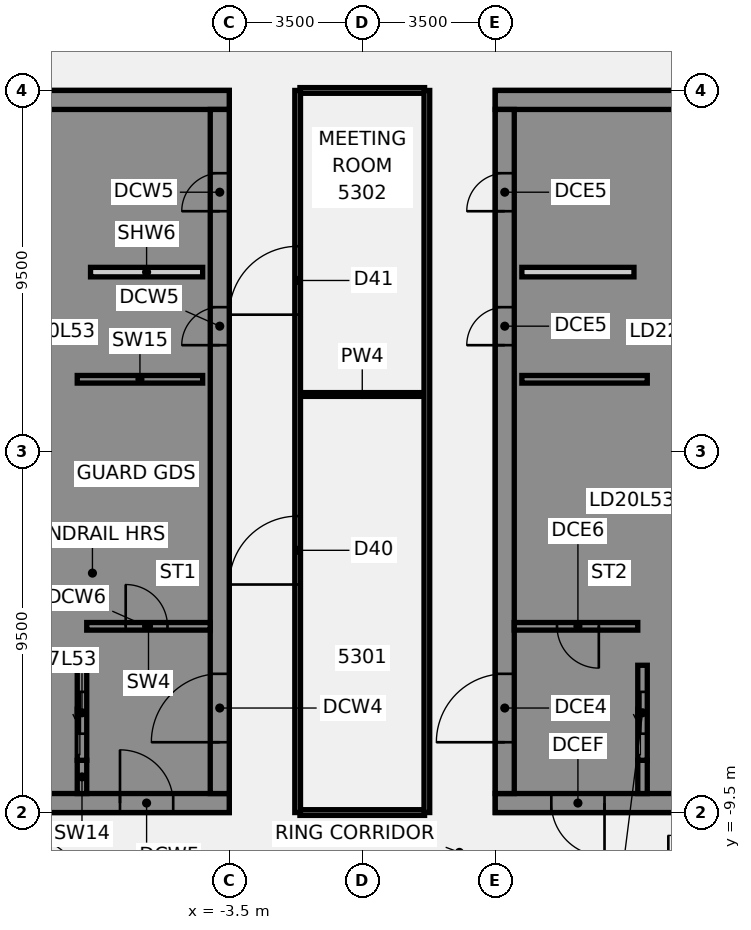
"""IFC4 building model, lengths in metres.
Left out: names, types, materials, properties, quantities, classifications, styles, units other than length and angle.
Written with IfcOpenShell. Run it as: python <this file> out.ifc"""

import sys

from ifc_helpers import new_model, si_unit, direction, frame, frame_2d, origin, place, context, subcontext, project, spatial, polyline, rectangle, outline, extrude, element, fill, save


model = new_model("IFC4")
c1 = context("Model", 3, precision=1e-05, world=origin(), true_north=direction((0.0, 1.0)))
c2 = subcontext(c1, "Body", "Model", "MODEL_VIEW")
j1 = project(units=[si_unit("LENGTHUNIT", "METRE"), si_unit("PLANEANGLEUNIT", "RADIAN")], contexts=[c1])
p1 = place(None, origin())
s1 = spatial("IfcSite", under=j1, at=p1, CompositionType="ELEMENT")
p2 = place(p1, origin())
s2 = spatial("IfcBuilding", under=s1, at=p2, CompositionType="ELEMENT")
p3 = place(p2, frame((0.0, 0.0, 211.3)))
s3 = spatial("IfcBuildingStorey", under=s2, at=p3, CompositionType="ELEMENT", Elevation=211.3)
p4 = place(p3, frame((-1.64, -9.5, 0.0), z_axis=(0.0, 0.0, 1.0), x_axis=(1.0, 0.0, 0.0)))
e1 = element("IfcWall", 1, at=p4, inside=s3, PredefinedType="PARTITIONING", context=c2, shape_type="SweptSolid", body=[
    extrude(rectangle(XDim=3.28, YDim=0.15, at=frame_2d((1.64, 0.0))), origin(), (0.0, 0.0, 1.0), 2.824),
])
p5 = place(p3, frame((-1.64, 1.5, 0.0), z_axis=(0.0, 0.0, 1.0), x_axis=(1.0, 0.0, 0.0)))
e2 = element("IfcWall", 2, at=p5, inside=s3, PredefinedType="PARTITIONING", context=c2, shape_type="SweptSolid", body=[
    extrude(rectangle(XDim=3.28, YDim=0.1, at=frame_2d((1.64, 0.0))), origin(), (0.0, 0.0, 1.0), 2.824),
])
p6 = place(p3, frame((-1.64, 9.5, 0.0), z_axis=(0.0, 0.0, 1.0), x_axis=(1.0, 0.0, 0.0)))
e3 = element("IfcWall", 3, at=p6, inside=s3, PredefinedType="PARTITIONING", context=c2, shape_type="SweptSolid", body=[
    extrude(rectangle(XDim=3.28, YDim=0.15, at=frame_2d((1.64, 0.0))), origin(), (0.0, 0.0, 1.0), 2.824),
])
p7 = place(p3, frame((-1.7, -9.5, 0.0), z_axis=(0.0, 0.0, 1.0), x_axis=(0.0, 1.0, 0.0)))
e4 = element("IfcWall", 4, at=p7, inside=s3, PredefinedType="PARTITIONING", context=c2, shape_type="SweptSolid", body=[
    extrude(rectangle(XDim=19.0, YDim=0.15, at=frame_2d((9.5, 0.0))), origin(), (0.0, 0.0, 1.0), 2.824),
])
p8 = place(p7, frame((6.0, 0.0, 0.0)))
e5 = element("IfcOpeningElement", 5, at=p8, cuts=e4, PredefinedType="OPENING", context=c2, shape_type="SweptSolid", body=[
    extrude(rectangle(XDim=1.8, YDim=2.1, at=frame_2d((0.9, 1.05))), frame((0.0, 0.085, 0.0), z_axis=(0.0, -1.0, 0.0), x_axis=(1.0, 0.0, 0.0)), (0.0, 0.0, 1.0), 0.17),
])
p9 = place(p7, frame((13.1, 0.0, 0.0)))
e6 = element("IfcOpeningElement", 6, at=p9, cuts=e4, PredefinedType="OPENING", context=c2, shape_type="SweptSolid", body=[
    extrude(rectangle(XDim=1.8, YDim=2.1, at=frame_2d((0.9, 1.05))), frame((0.0, 0.085, 0.0), z_axis=(0.0, -1.0, 0.0), x_axis=(1.0, 0.0, 0.0)), (0.0, 0.0, 1.0), 0.17),
])
p10 = place(p3, frame((1.7, -9.5, 0.0), z_axis=(0.0, 0.0, 1.0), x_axis=(0.0, 1.0, 0.0)))
e7 = element("IfcWall", 7, at=p10, inside=s3, PredefinedType="PARTITIONING", context=c2, shape_type="SweptSolid", body=[
    extrude(rectangle(XDim=19.0, YDim=0.15, at=frame_2d((9.5, 0.0))), origin(), (0.0, 0.0, 1.0), 2.824),
])
p11 = place(p3, frame((-16.5, -9.25, 0.0), z_axis=(0.0, 0.0, 1.0), x_axis=(1.0, 0.0, 0.0)))
e8 = element("IfcWall", 8, at=p11, inside=s3, PredefinedType="SHEAR", context=c2, shape_type="SweptSolid", body=[
    extrude(rectangle(XDim=13.0, YDim=0.5, at=frame_2d((6.5, 0.0))), origin(), (0.0, 0.0, 1.0), 3.42),
])
p12 = place(p11, frame((4.15, 0.0, 0.0)))
e9 = element("IfcOpeningElement", 9, at=p12, cuts=e8, PredefinedType="OPENING", context=c2, shape_type="SweptSolid", body=[
    extrude(rectangle(XDim=1.4, YDim=2.1, at=frame_2d((0.7, 1.05))), frame((0.0, 0.26, 0.0), z_axis=(0.0, -1.0, 0.0), x_axis=(1.0, 0.0, 0.0)), (0.0, 0.0, 1.0), 0.52),
])
p13 = place(p11, frame((10.125, 0.0, 0.0)))
e10 = element("IfcOpeningElement", 10, at=p13, cuts=e8, PredefinedType="OPENING", context=c2, shape_type="SweptSolid", body=[
    extrude(rectangle(XDim=1.4, YDim=2.1, at=frame_2d((0.7, 1.05))), frame((0.0, 0.26, 0.0), z_axis=(0.0, -1.0, 0.0), x_axis=(1.0, 0.0, 0.0)), (0.0, 0.0, 1.0), 0.52),
])
p14 = place(p3, frame((-16.5, 9.25, 0.0), z_axis=(0.0, 0.0, 1.0), x_axis=(1.0, 0.0, 0.0)))
e11 = element("IfcWall", 11, at=p14, inside=s3, PredefinedType="SHEAR", context=c2, shape_type="SweptSolid", body=[
    extrude(rectangle(XDim=13.0, YDim=0.5, at=frame_2d((6.5, 0.0))), origin(), (0.0, 0.0, 1.0), 3.42),
])
p15 = place(p3, origin())
e12 = element("IfcWall", 12, at=p15, inside=s3, PredefinedType="SHEAR", context=c2, shape_type="SweptSolid", body=[
    extrude(outline(polyline([(-9.8, -5.375), (-9.8, -5.625), (-7.5, -5.625), (-7.25, -5.625), (-7.25, 9.0), (-7.5, 9.0), (-9.8, 9.0), (-9.8, 8.125), (-7.5, 8.125), (-7.5, 5.625), (-9.8, 5.625), (-9.8, 5.375), (-7.5, 5.375), (-7.5, 2.875), (-9.8, 2.875), (-9.8, 2.625), (-7.5, 2.625), (-7.5, 0.125), (-9.8, 0.125), (-9.8, -0.125), (-7.5, -0.125), (-7.5, -2.625), (-9.8, -2.625), (-9.8, -2.875), (-7.5, -2.875), (-7.5, -5.375), (-9.8, -5.375)])), origin(), (0.0, 0.0, 1.0), 3.42),
])
p16 = place(p3, origin())
e13 = element("IfcWall", 13, at=p16, inside=s3, PredefinedType="SHEAR", context=c2, shape_type="SweptSolid", body=[
    extrude(outline(polyline([(-7.5, -8.125), (-9.55, -8.125), (-9.55, -5.625), (-9.8, -5.625), (-9.8, -8.125), (-9.8, -9.0), (-7.5, -9.0), (-7.5, -8.125)])), origin(), (0.0, 0.0, 1.0), 3.42),
])
p17 = place(p3, frame((-7.375, -9.0, 0.0), z_axis=(0.0, 0.0, 1.0), x_axis=(0.0, 1.0, 0.0)))
e14 = element("IfcWall", 14, at=p17, inside=s3, PredefinedType="SHEAR", context=c2, shape_type="SweptSolid", body=[
    extrude(rectangle(XDim=0.875, YDim=0.25, at=frame_2d((0.438, 0.0))), origin(), (0.0, 0.0, 1.0), 3.42),
])
p18 = place(p3, frame((-7.5, 1.9, 0.0), z_axis=(0.0, 0.0, 1.0), x_axis=(1.0, 0.0, 0.0)))
e15 = element("IfcWall", 15, at=p18, inside=s3, PredefinedType="SHEAR", context=c2, shape_type="SweptSolid", body=[
    extrude(rectangle(XDim=3.3, YDim=0.2, at=frame_2d((1.65, 0.0))), origin(), (0.0, 0.0, 1.0), 3.42),
])
p19 = place(p3, frame((-7.375, -8.125, 0.0), z_axis=(0.0, 0.0, 1.0), x_axis=(0.0, 1.0, 0.0)))
e16 = element("IfcWall", 16, at=p19, inside=s3, PredefinedType="SHEAR", context=c2, shape_type="SweptSolid", body=[
    extrude(rectangle(XDim=2.5, YDim=0.25, at=frame_2d((1.25, 0.0))), origin(), (0.0, 0.0, 1.0), 3.42),
])
p20 = place(p19, frame((0.7, 0.0, 0.0)))
e17 = element("IfcOpeningElement", 17, at=p20, cuts=e16, PredefinedType="OPENING", context=c2, shape_type="SweptSolid", body=[
    extrude(rectangle(XDim=1.1, YDim=2.1, at=frame_2d((0.55, 1.05))), frame((0.0, 0.135, 0.0), z_axis=(0.0, -1.0, 0.0), x_axis=(1.0, 0.0, 0.0)), (0.0, 0.0, 1.0), 0.27),
])
p21 = place(p3, frame((-3.75, -9.0, 0.0), z_axis=(0.0, 0.0, 1.0), x_axis=(0.0, 1.0, 0.0)))
e18 = element("IfcWall", 18, at=p21, inside=s3, PredefinedType="SHEAR", context=c2, shape_type="SweptSolid", body=[
    extrude(rectangle(XDim=18.0, YDim=0.5, at=frame_2d((9.0, 0.0))), origin(), (0.0, 0.0, 1.0), 3.42),
])
p22 = place(p21, frame((1.35, 0.0, 0.0)))
e19 = element("IfcOpeningElement", 19, at=p22, cuts=e18, PredefinedType="OPENING", context=c2, shape_type="SweptSolid", body=[
    extrude(rectangle(XDim=1.8, YDim=2.1, at=frame_2d((0.9, 1.05))), frame((0.0, 0.26, 0.0), z_axis=(0.0, -1.0, 0.0), x_axis=(1.0, 0.0, 0.0)), (0.0, 0.0, 1.0), 0.52),
])
p23 = place(p21, frame((11.798, 0.0, 0.0)))
e20 = element("IfcOpeningElement", 20, at=p23, cuts=e18, PredefinedType="OPENING", context=c2, shape_type="SweptSolid", body=[
    extrude(rectangle(XDim=1.0, YDim=2.1, at=frame_2d((0.5, 1.05))), frame((0.0, 0.26, 0.0), z_axis=(0.0, -1.0, 0.0), x_axis=(1.0, 0.0, 0.0)), (0.0, 0.0, 1.0), 0.52),
])
p24 = place(p21, frame((15.323, 0.0, 0.0)))
e21 = element("IfcOpeningElement", 21, at=p24, cuts=e18, PredefinedType="OPENING", context=c2, shape_type="SweptSolid", body=[
    extrude(rectangle(XDim=1.0, YDim=2.1, at=frame_2d((0.5, 1.05))), frame((0.0, 0.26, 0.0), z_axis=(0.0, -1.0, 0.0), x_axis=(1.0, 0.0, 0.0)), (0.0, 0.0, 1.0), 0.52),
])
p25 = place(p3, frame((-7.15, 4.72, 0.0), z_axis=(0.0, 0.0, 1.0), x_axis=(1.0, 0.0, 0.0)))
e22 = element("IfcWall", 22, at=p25, inside=s3, PredefinedType="PARTITIONING", context=c2, shape_type="SweptSolid", body=[
    extrude(rectangle(XDim=2.95, YDim=0.25, at=frame_2d((1.475, 0.0))), origin(), (0.0, 0.0, 1.0), 3.42),
])
p26 = place(p3, frame((-7.25, -4.6, 0.0), z_axis=(0.0, 0.0, 1.0), x_axis=(1.0, 0.0, 0.0)))
e23 = element("IfcWall", 23, at=p26, inside=s3, PredefinedType="SHEAR", context=c2, shape_type="SweptSolid", body=[
    extrude(rectangle(XDim=3.25, YDim=0.2, at=frame_2d((1.625, 0.0))), origin(), (0.0, 0.0, 1.0), 3.42),
])
p27 = place(p26, frame((1.025, 0.0, 0.0)))
e24 = element("IfcOpeningElement", 24, at=p27, cuts=e23, PredefinedType="OPENING", context=c2, shape_type="SweptSolid", body=[
    extrude(rectangle(XDim=1.1, YDim=2.1, at=frame_2d((0.55, 1.05))), frame((0.0, 0.11, 0.0), z_axis=(0.0, -1.0, 0.0), x_axis=(1.0, 0.0, 0.0)), (0.0, 0.0, 1.0), 0.22),
])
p28 = place(p3, frame((16.5, -9.25, 0.0), z_axis=(0.0, 0.0, 1.0), x_axis=(-1.0, 0.0, 0.0)))
e25 = element("IfcWall", 25, at=p28, inside=s3, PredefinedType="SHEAR", context=c2, shape_type="SweptSolid", body=[
    extrude(rectangle(XDim=13.0, YDim=0.5, at=frame_2d((6.5, 0.0))), origin(), (0.0, 0.0, 1.0), 3.42),
])
p29 = place(p28, frame((4.15, 0.0, 0.0)))
e26 = element("IfcOpeningElement", 26, at=p29, cuts=e25, PredefinedType="OPENING", context=c2, shape_type="SweptSolid", body=[
    extrude(rectangle(XDim=1.4, YDim=2.1, at=frame_2d((0.7, 1.05))), frame((0.0, 0.26, 0.0), z_axis=(0.0, -1.0, 0.0), x_axis=(1.0, 0.0, 0.0)), (0.0, 0.0, 1.0), 0.52),
])
p30 = place(p28, frame((10.125, 0.0, 0.0)))
e27 = element("IfcOpeningElement", 27, at=p30, cuts=e25, PredefinedType="OPENING", context=c2, shape_type="SweptSolid", body=[
    extrude(rectangle(XDim=1.4, YDim=2.1, at=frame_2d((0.7, 1.05))), frame((0.0, 0.26, 0.0), z_axis=(0.0, -1.0, 0.0), x_axis=(1.0, 0.0, 0.0)), (0.0, 0.0, 1.0), 0.52),
])
p31 = place(p3, frame((16.5, 9.25, 0.0), z_axis=(0.0, 0.0, 1.0), x_axis=(-1.0, 0.0, 0.0)))
e28 = element("IfcWall", 28, at=p31, inside=s3, PredefinedType="SHEAR", context=c2, shape_type="SweptSolid", body=[
    extrude(rectangle(XDim=13.0, YDim=0.5, at=frame_2d((6.5, 0.0))), origin(), (0.0, 0.0, 1.0), 3.42),
])
p32 = place(p3, origin())
e29 = element("IfcWall", 29, at=p32, inside=s3, PredefinedType="SHEAR", context=c2, shape_type="SweptSolid", body=[
    extrude(outline(polyline([(9.8, -5.375), (7.5, -5.375), (7.5, -2.875), (9.8, -2.875), (9.8, -2.625), (7.5, -2.625), (7.5, -0.125), (9.8, -0.125), (9.8, 0.125), (7.5, 0.125), (7.5, 2.625), (9.8, 2.625), (9.8, 2.875), (7.5, 2.875), (7.5, 5.375), (9.8, 5.375), (9.8, 5.625), (7.5, 5.625), (7.5, 8.125), (9.8, 8.125), (9.8, 9.0), (7.5, 9.0), (7.25, 9.0), (7.25, -5.625), (7.5, -5.625), (9.8, -5.625), (9.8, -5.375)])), origin(), (0.0, 0.0, 1.0), 3.42),
])
p33 = place(p3, origin())
e30 = element("IfcWall", 30, at=p33, inside=s3, PredefinedType="SHEAR", context=c2, shape_type="SweptSolid", body=[
    extrude(outline(polyline([(7.5, -8.125), (7.5, -9.0), (9.8, -9.0), (9.8, -8.125), (9.8, -5.625), (9.55, -5.625), (9.55, -8.125), (7.5, -8.125)])), origin(), (0.0, 0.0, 1.0), 3.42),
])
p34 = place(p3, frame((7.375, -9.0, 0.0), z_axis=(0.0, 0.0, 1.0), x_axis=(0.0, 1.0, 0.0)))
e31 = element("IfcWall", 31, at=p34, inside=s3, PredefinedType="SHEAR", context=c2, shape_type="SweptSolid", body=[
    extrude(rectangle(XDim=0.875, YDim=0.25, at=frame_2d((0.438, 0.0))), origin(), (0.0, 0.0, 1.0), 3.42),
])
p35 = place(p3, frame((7.5, 1.9, 0.0), z_axis=(0.0, 0.0, 1.0), x_axis=(-1.0, 0.0, 0.0)))
e32 = element("IfcWall", 32, at=p35, inside=s3, PredefinedType="SHEAR", context=c2, shape_type="SweptSolid", body=[
    extrude(rectangle(XDim=3.3, YDim=0.2, at=frame_2d((1.65, 0.0))), origin(), (0.0, 0.0, 1.0), 3.42),
])
p36 = place(p3, frame((7.375, -8.125, 0.0), z_axis=(0.0, 0.0, 1.0), x_axis=(0.0, 1.0, 0.0)))
e33 = element("IfcWall", 33, at=p36, inside=s3, PredefinedType="SHEAR", context=c2, shape_type="SweptSolid", body=[
    extrude(rectangle(XDim=2.5, YDim=0.25, at=frame_2d((1.25, 0.0))), origin(), (0.0, 0.0, 1.0), 3.42),
])
p37 = place(p36, frame((0.7, 0.0, 0.0)))
e34 = element("IfcOpeningElement", 34, at=p37, cuts=e33, PredefinedType="OPENING", context=c2, shape_type="SweptSolid", body=[
    extrude(rectangle(XDim=1.1, YDim=2.1, at=frame_2d((0.55, 1.05))), frame((0.0, 0.135, 0.0), z_axis=(0.0, -1.0, 0.0), x_axis=(1.0, 0.0, 0.0)), (0.0, 0.0, 1.0), 0.27),
])
p38 = place(p3, frame((3.75, -9.0, 0.0), z_axis=(0.0, 0.0, 1.0), x_axis=(0.0, 1.0, 0.0)))
e35 = element("IfcWall", 35, at=p38, inside=s3, PredefinedType="SHEAR", context=c2, shape_type="SweptSolid", body=[
    extrude(rectangle(XDim=18.0, YDim=0.5, at=frame_2d((9.0, 0.0))), origin(), (0.0, 0.0, 1.0), 3.42),
])
p39 = place(p38, frame((1.35, 0.0, 0.0)))
e36 = element("IfcOpeningElement", 36, at=p39, cuts=e35, PredefinedType="OPENING", context=c2, shape_type="SweptSolid", body=[
    extrude(rectangle(XDim=1.8, YDim=2.1, at=frame_2d((0.9, 1.05))), frame((0.0, 0.26, 0.0), z_axis=(0.0, -1.0, 0.0), x_axis=(1.0, 0.0, 0.0)), (0.0, 0.0, 1.0), 0.52),
])
p40 = place(p38, frame((11.798, 0.0, 0.0)))
e37 = element("IfcOpeningElement", 37, at=p40, cuts=e35, PredefinedType="OPENING", context=c2, shape_type="SweptSolid", body=[
    extrude(rectangle(XDim=1.0, YDim=2.1, at=frame_2d((0.5, 1.05))), frame((0.0, 0.26, 0.0), z_axis=(0.0, -1.0, 0.0), x_axis=(1.0, 0.0, 0.0)), (0.0, 0.0, 1.0), 0.52),
])
p41 = place(p38, frame((15.323, 0.0, 0.0)))
e38 = element("IfcOpeningElement", 38, at=p41, cuts=e35, PredefinedType="OPENING", context=c2, shape_type="SweptSolid", body=[
    extrude(rectangle(XDim=1.0, YDim=2.1, at=frame_2d((0.5, 1.05))), frame((0.0, 0.26, 0.0), z_axis=(0.0, -1.0, 0.0), x_axis=(1.0, 0.0, 0.0)), (0.0, 0.0, 1.0), 0.52),
])
p42 = place(p3, frame((7.15, 4.72, 0.0), z_axis=(0.0, 0.0, 1.0), x_axis=(-1.0, 0.0, 0.0)))
e39 = element("IfcWall", 39, at=p42, inside=s3, PredefinedType="PARTITIONING", context=c2, shape_type="SweptSolid", body=[
    extrude(rectangle(XDim=2.95, YDim=0.25, at=frame_2d((1.475, 0.0))), origin(), (0.0, 0.0, 1.0), 3.42),
])
p43 = place(p3, frame((7.25, -4.6, 0.0), z_axis=(0.0, 0.0, 1.0), x_axis=(-1.0, 0.0, 0.0)))
e40 = element("IfcWall", 40, at=p43, inside=s3, PredefinedType="SHEAR", context=c2, shape_type="SweptSolid", body=[
    extrude(rectangle(XDim=3.25, YDim=0.2, at=frame_2d((1.625, 0.0))), origin(), (0.0, 0.0, 1.0), 3.42),
])
p44 = place(p43, frame((1.025, 0.0, 0.0)))
e41 = element("IfcOpeningElement", 41, at=p44, cuts=e40, PredefinedType="OPENING", context=c2, shape_type="SweptSolid", body=[
    extrude(rectangle(XDim=1.1, YDim=2.1, at=frame_2d((0.55, 1.05))), frame((0.0, 0.11, 0.0), z_axis=(0.0, -1.0, 0.0), x_axis=(1.0, 0.0, 0.0)), (0.0, 0.0, 1.0), 0.22),
])
p45 = place(p8, frame((1.8, 0.0, 0.0), z_axis=(0.0, 0.0, 1.0), x_axis=(-1.0, 0.0, 0.0)))
e42 = element("IfcDoor", 42, at=p45, inside=s3, OperationType="DOUBLE_DOOR_SINGLE_SWING", PredefinedType="DOOR", context=c2, shape_type="SweptSolid", body=[
    extrude(rectangle(XDim=1.8, YDim=2.1, at=frame_2d((0.9, 1.05))), frame((0.0, 0.025, 0.0), z_axis=(0.0, -1.0, 0.0), x_axis=(1.0, 0.0, 0.0)), (0.0, 0.0, 1.0), 0.05),
])
fill(e5, e42)
p46 = place(p9, frame((1.8, 0.0, 0.0), z_axis=(0.0, 0.0, 1.0), x_axis=(-1.0, 0.0, 0.0)))
e43 = element("IfcDoor", 43, at=p46, inside=s3, OperationType="DOUBLE_DOOR_SINGLE_SWING", PredefinedType="DOOR", context=c2, shape_type="SweptSolid", body=[
    extrude(rectangle(XDim=1.8, YDim=2.1, at=frame_2d((0.9, 1.05))), frame((0.0, 0.025, 0.0), z_axis=(0.0, -1.0, 0.0), x_axis=(1.0, 0.0, 0.0)), (0.0, 0.0, 1.0), 0.05),
])
fill(e6, e43)
p47 = place(p13, origin())
e44 = element("IfcDoor", 44, at=p47, inside=s3, OperationType="SINGLE_SWING_LEFT", PredefinedType="DOOR", context=c2, shape_type="SweptSolid", body=[
    extrude(rectangle(XDim=1.4, YDim=2.1, at=frame_2d((0.7, 1.05))), frame((0.0, 0.025, 0.0), z_axis=(0.0, -1.0, 0.0), x_axis=(1.0, 0.0, 0.0)), (0.0, 0.0, 1.0), 0.05),
])
fill(e10, e44)
p48 = place(p22, origin())
e45 = element("IfcDoor", 45, at=p48, inside=s3, OperationType="SINGLE_SWING_LEFT", PredefinedType="DOOR", context=c2, shape_type="SweptSolid", body=[
    extrude(rectangle(XDim=1.8, YDim=2.1, at=frame_2d((0.9, 1.05))), frame((0.0, 0.025, 0.0), z_axis=(0.0, -1.0, 0.0), x_axis=(1.0, 0.0, 0.0)), (0.0, 0.0, 1.0), 0.05),
])
fill(e19, e45)
p49 = place(p23, origin())
e46 = element("IfcDoor", 46, at=p49, inside=s3, OperationType="SINGLE_SWING_LEFT", PredefinedType="DOOR", context=c2, shape_type="SweptSolid", body=[
    extrude(rectangle(XDim=1.0, YDim=2.1, at=frame_2d((0.5, 1.05))), frame((0.0, 0.225, 0.0), z_axis=(0.0, -1.0, 0.0), x_axis=(1.0, 0.0, 0.0)), (0.0, 0.0, 1.0), 0.05),
])
fill(e20, e46)
p50 = place(p24, origin())
e47 = element("IfcDoor", 47, at=p50, inside=s3, OperationType="SINGLE_SWING_LEFT", PredefinedType="DOOR", context=c2, shape_type="SweptSolid", body=[
    extrude(rectangle(XDim=1.0, YDim=2.1, at=frame_2d((0.5, 1.05))), frame((0.0, 0.225, 0.0), z_axis=(0.0, -1.0, 0.0), x_axis=(1.0, 0.0, 0.0)), (0.0, 0.0, 1.0), 0.05),
])
fill(e21, e47)
p51 = place(p27, origin())
e48 = element("IfcDoor", 48, at=p51, inside=s3, OperationType="SINGLE_SWING_LEFT", PredefinedType="DOOR", context=c2, shape_type="SweptSolid", body=[
    extrude(rectangle(XDim=1.1, YDim=2.1, at=frame_2d((0.55, 1.05))), frame((0.0, 0.025, 0.0), z_axis=(0.0, -1.0, 0.0), x_axis=(1.0, 0.0, 0.0)), (0.0, 0.0, 1.0), 0.05),
])
fill(e24, e48)
p52 = place(p20, origin())
e49 = element("IfcDoor", 49, at=p52, inside=s3, OperationType="SLIDING_TO_LEFT", PredefinedType="DOOR", context=c2, shape_type="SweptSolid", body=[
    extrude(rectangle(XDim=1.1, YDim=2.1, at=frame_2d((0.55, 1.05))), frame((0.0, 0.025, 0.0), z_axis=(0.0, -1.0, 0.0), x_axis=(1.0, 0.0, 0.0)), (0.0, 0.0, 1.0), 0.05),
])
fill(e17, e49)
p53 = place(p30, origin())
e50 = element("IfcDoor", 50, at=p53, inside=s3, OperationType="SINGLE_SWING_LEFT", PredefinedType="DOOR", context=c2, shape_type="SweptSolid", body=[
    extrude(rectangle(XDim=1.4, YDim=2.1, at=frame_2d((0.7, 1.05))), frame((0.0, 0.025, 0.0), z_axis=(0.0, -1.0, 0.0), x_axis=(1.0, 0.0, 0.0)), (0.0, 0.0, 1.0), 0.05),
])
fill(e27, e50)
p54 = place(p39, origin())
e51 = element("IfcDoor", 51, at=p54, inside=s3, OperationType="SINGLE_SWING_LEFT", PredefinedType="DOOR", context=c2, shape_type="SweptSolid", body=[
    extrude(rectangle(XDim=1.8, YDim=2.1, at=frame_2d((0.9, 1.05))), frame((0.0, 0.025, 0.0), z_axis=(0.0, -1.0, 0.0), x_axis=(1.0, 0.0, 0.0)), (0.0, 0.0, 1.0), 0.05),
])
fill(e36, e51)
p55 = place(p40, origin())
e52 = element("IfcDoor", 52, at=p55, inside=s3, OperationType="SINGLE_SWING_LEFT", PredefinedType="DOOR", context=c2, shape_type="SweptSolid", body=[
    extrude(rectangle(XDim=1.0, YDim=2.1, at=frame_2d((0.5, 1.05))), frame((0.0, -0.175, 0.0), z_axis=(0.0, -1.0, 0.0), x_axis=(1.0, 0.0, 0.0)), (0.0, 0.0, 1.0), 0.05),
])
fill(e37, e52)
p56 = place(p41, origin())
e53 = element("IfcDoor", 53, at=p56, inside=s3, OperationType="SINGLE_SWING_LEFT", PredefinedType="DOOR", context=c2, shape_type="SweptSolid", body=[
    extrude(rectangle(XDim=1.0, YDim=2.1, at=frame_2d((0.5, 1.05))), frame((0.0, -0.175, 0.0), z_axis=(0.0, -1.0, 0.0), x_axis=(1.0, 0.0, 0.0)), (0.0, 0.0, 1.0), 0.05),
])
fill(e38, e53)
p57 = place(p44, origin())
e54 = element("IfcDoor", 54, at=p57, inside=s3, OperationType="SINGLE_SWING_LEFT", PredefinedType="DOOR", context=c2, shape_type="SweptSolid", body=[
    extrude(rectangle(XDim=1.1, YDim=2.1, at=frame_2d((0.55, 1.05))), frame((0.0, 0.025, 0.0), z_axis=(0.0, -1.0, 0.0), x_axis=(1.0, 0.0, 0.0)), (0.0, 0.0, 1.0), 0.05),
])
fill(e41, e54)
p58 = place(p37, origin())
e55 = element("IfcDoor", 55, at=p58, inside=s3, OperationType="SLIDING_TO_LEFT", PredefinedType="DOOR", context=c2, shape_type="SweptSolid", body=[
    extrude(rectangle(XDim=1.1, YDim=2.1, at=frame_2d((0.55, 1.05))), frame((0.0, 0.025, 0.0), z_axis=(0.0, -1.0, 0.0), x_axis=(1.0, 0.0, 0.0)), (0.0, 0.0, 1.0), 0.05),
])
fill(e34, e55)
save(model, sys.argv[1])
